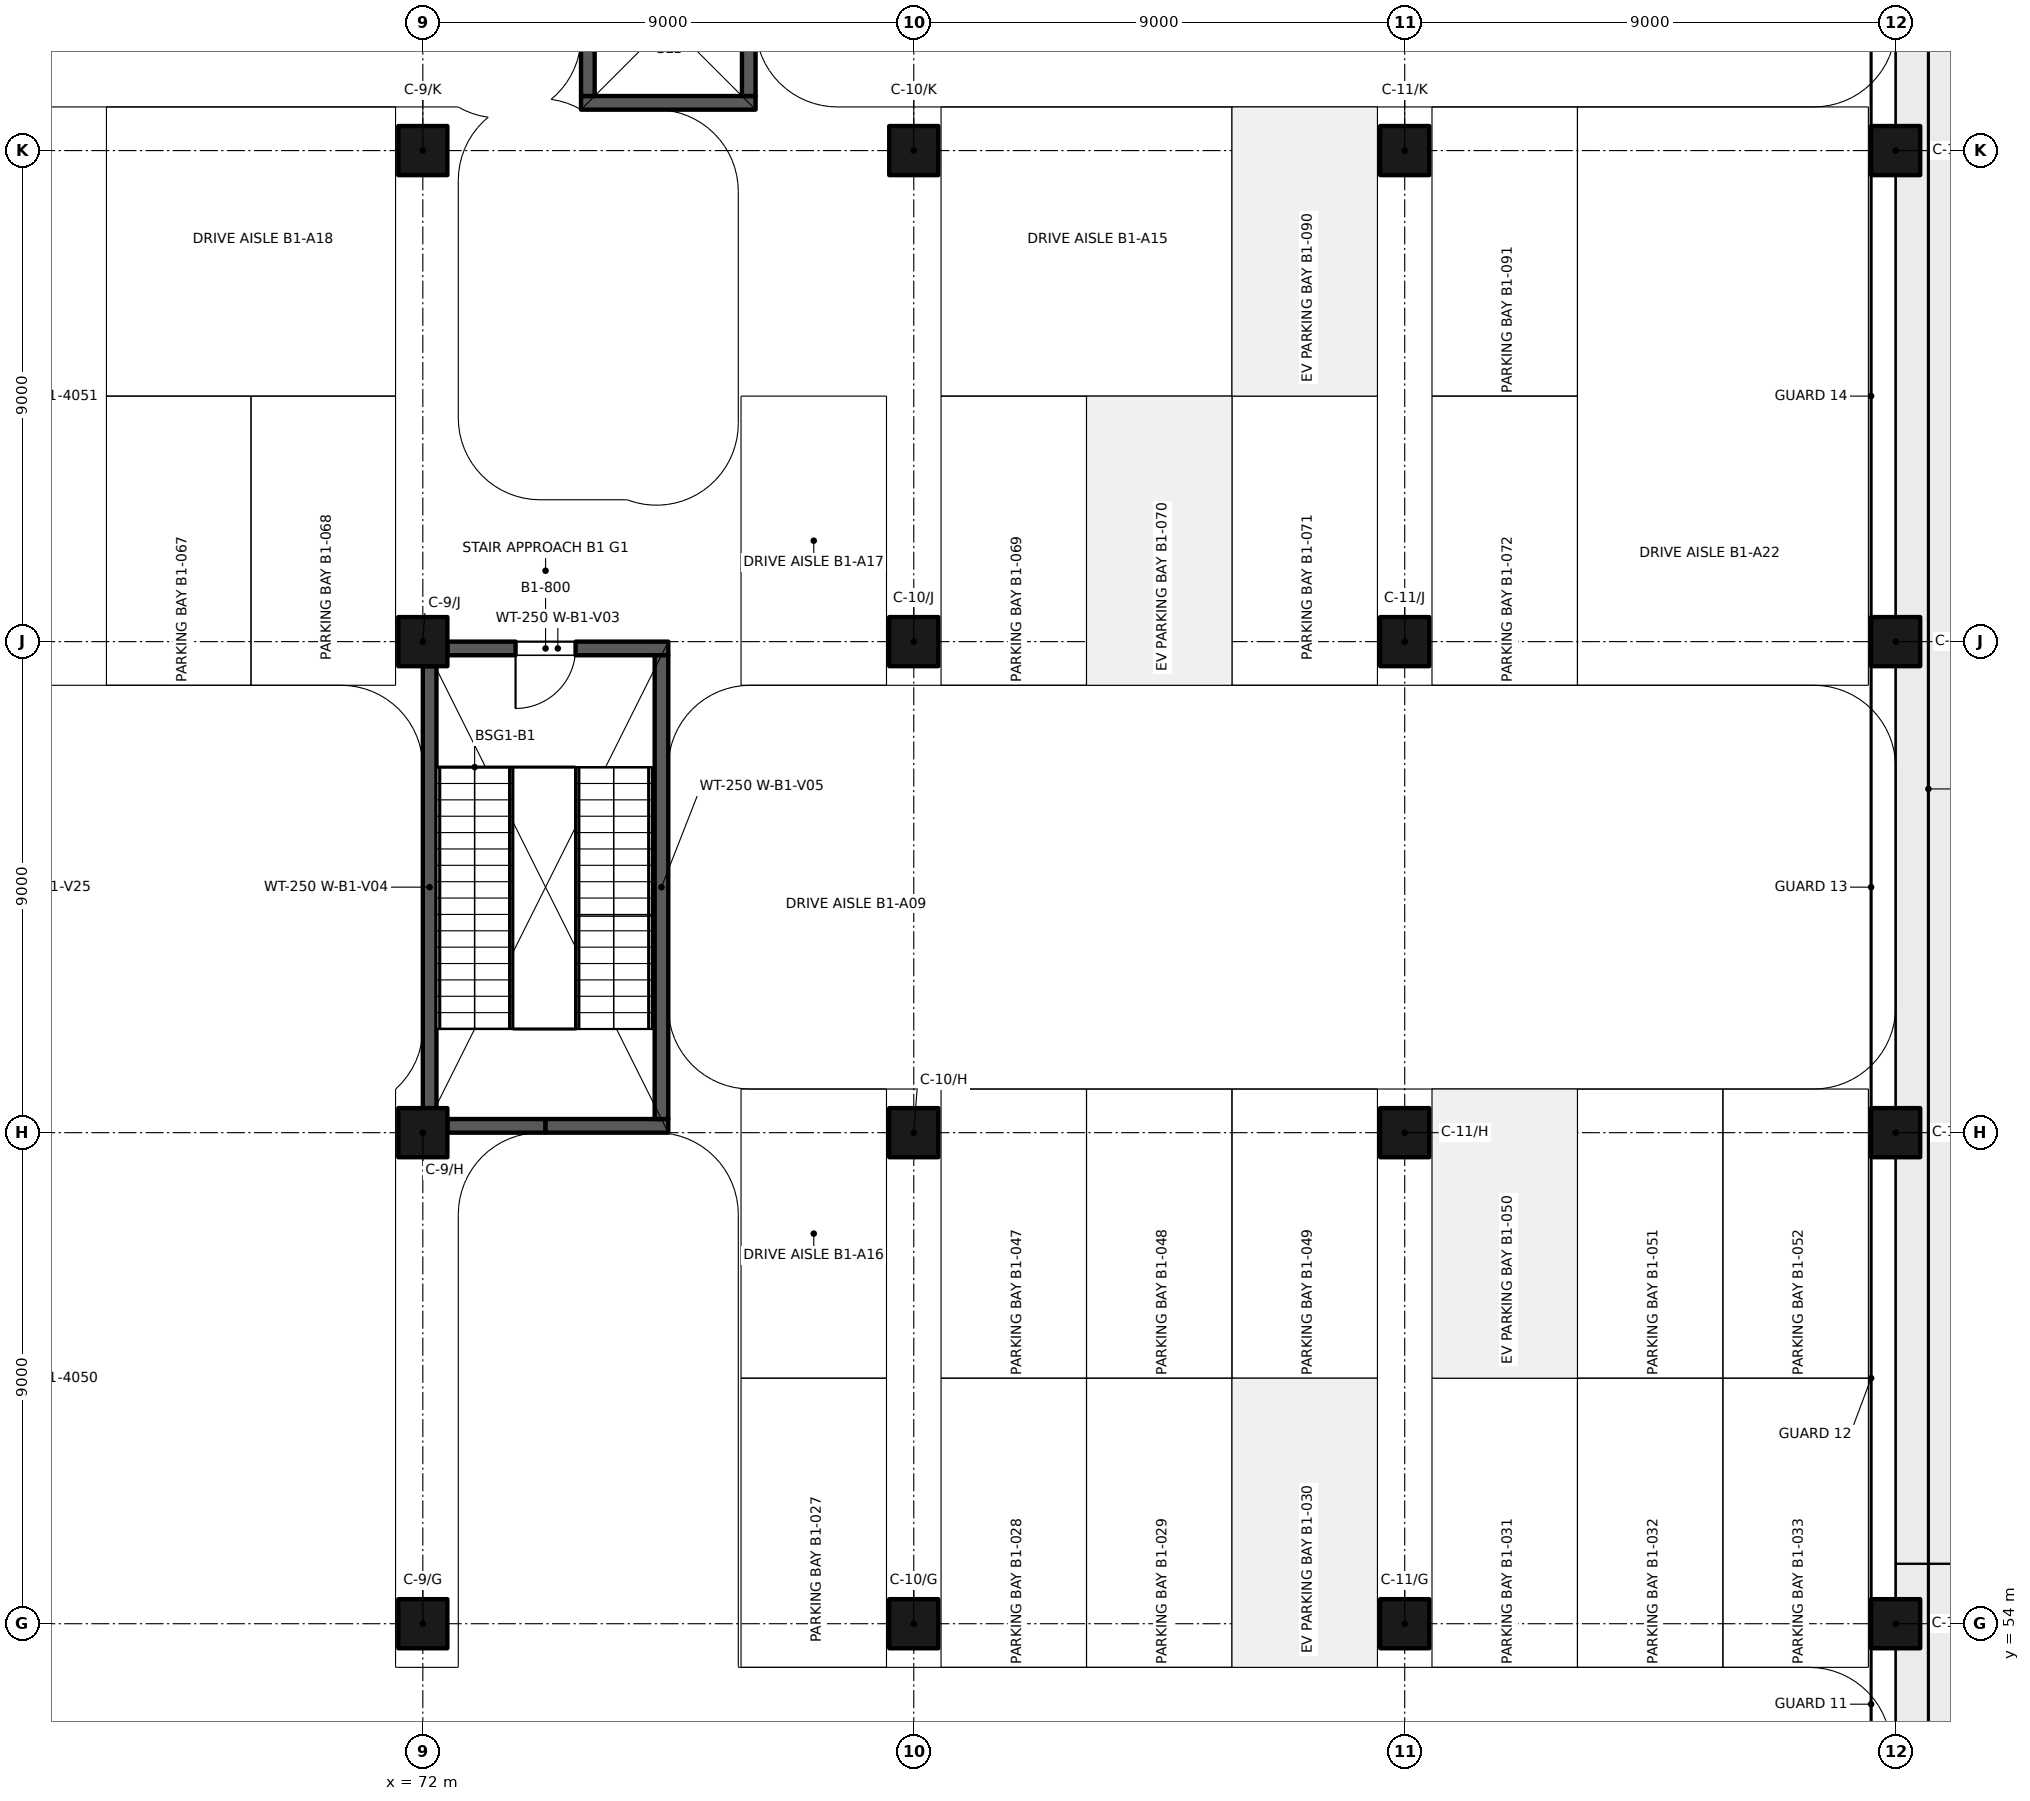
"""IFC4 building model, lengths in metres.
Left out: names, types, materials, properties, quantities, classifications, styles, units other than length and angle.
Written with IfcOpenShell. Run it as: python <this file> out.ifc"""

import sys

from ifc_helpers import new_model, si_unit, direction, frame, frame_2d, origin, origin_2d, place, context, subcontext, project, spatial, rectangle, extrude, element, fill, save


model = new_model("IFC4")
c1 = context("Model", 3, precision=1e-05, world=origin(), true_north=direction((0.0, 1.0)))
c2 = subcontext(c1, "Body", "Model", "MODEL_VIEW")
j1 = project(units=[si_unit("LENGTHUNIT", "METRE"), si_unit("PLANEANGLEUNIT", "RADIAN")], contexts=[c1])
p1 = place(None, origin())
s1 = spatial("IfcSite", under=j1, at=p1, CompositionType="ELEMENT")
p2 = place(p1, origin())
s2 = spatial("IfcBuilding", under=s1, at=p2, CompositionType="ELEMENT")
p3 = place(p2, frame((0.0, 0.0, -5.1)))
s3 = spatial("IfcBuildingStorey", under=s2, at=p3, CompositionType="ELEMENT", Elevation=-5.1)
for number, where, z_axis, x_axis in (
    (1, (72.0, 54.0, 0.0), (0.0, 0.0, 1.0), (1.0, 0.0, 0.0)),
    (2, (81.0, 54.0, 0.0), (0.0, 0.0, 1.0), (1.0, 0.0, 0.0)),
    (3, (90.0, 54.0, 0.0), (0.0, 0.0, 1.0), (1.0, 0.0, 0.0)),
    (4, (99.0, 54.0, 0.0), (0.0, 0.0, 1.0), (1.0, 0.0, 0.0)),
    (5, (72.0, 63.0, 0.0), (0.0, 0.0, 1.0), (1.0, 0.0, 0.0)),
    (6, (81.0, 63.0, 0.0), (0.0, 0.0, 1.0), (1.0, 0.0, 0.0)),
    (7, (90.0, 63.0, 0.0), (0.0, 0.0, 1.0), (1.0, 0.0, 0.0)),
    (8, (99.0, 63.0, 0.0), (0.0, 0.0, 1.0), (1.0, 0.0, 0.0)),
    (9, (72.0, 72.0, 0.0), (0.0, 0.0, 1.0), (1.0, 0.0, 0.0)),
    (10, (81.0, 72.0, 0.0), (0.0, 0.0, 1.0), (1.0, 0.0, 0.0)),
    (11, (90.0, 72.0, 0.0), (0.0, 0.0, 1.0), (1.0, 0.0, 0.0)),
    (12, (99.0, 72.0, 0.0), (0.0, 0.0, 1.0), (1.0, 0.0, 0.0)),
    (13, (72.0, 81.0, 0.0), (0.0, 0.0, 1.0), (1.0, 0.0, 0.0)),
    (14, (81.0, 81.0, 0.0), (0.0, 0.0, 1.0), (1.0, 0.0, 0.0)),
    (15, (90.0, 81.0, 0.0), (0.0, 0.0, 1.0), (1.0, 0.0, 0.0)),
    (16, (99.0, 81.0, 0.0), (0.0, 0.0, 1.0), (1.0, 0.0, 0.0)),
):
    element("IfcColumn", number, at=place(p3, frame(where, z_axis=z_axis, x_axis=x_axis)), inside=s3, PredefinedType="COLUMN", context=c2, shape_type="SweptSolid", body=[
        extrude(rectangle(XDim=0.9, YDim=0.9, at=origin_2d()), origin(), (0.0, 0.0, 1.0), 5.1),
    ])
p4 = place(p3, frame((72.45, 63.125, 0.0), z_axis=(0.0, 0.0, 1.0), x_axis=(1.0, 0.0, 0.0)))
e17 = element("IfcWall", 17, at=p4, inside=s3, PredefinedType="SHEAR", context=c2, shape_type="SweptSolid", body=[
    extrude(rectangle(XDim=1.8, YDim=0.25, at=frame_2d((0.9, 0.0))), origin(), (0.0, 0.0, 1.0), 5.1),
])
p5 = place(p3, frame((74.25, 63.125, 0.0), z_axis=(0.0, 0.0, 1.0), x_axis=(1.0, 0.0, 0.0)))
e18 = element("IfcWall", 18, at=p5, inside=s3, PredefinedType="SHEAR", context=c2, shape_type="SweptSolid", body=[
    extrude(rectangle(XDim=2.25, YDim=0.25, at=frame_2d((1.125, 0.0))), origin(), (0.0, 0.0, 1.0), 5.1),
])
p6 = place(p3, frame((72.45, 71.875, 0.0), z_axis=(0.0, 0.0, 1.0), x_axis=(1.0, 0.0, 0.0)))
e19 = element("IfcWall", 19, at=p6, inside=s3, PredefinedType="SHEAR", context=c2, shape_type="SweptSolid", body=[
    extrude(rectangle(XDim=4.05, YDim=0.25, at=frame_2d((2.025, 0.0))), origin(), (0.0, 0.0, 1.0), 5.1),
])
p7 = place(p6, frame((2.35, 0.0, 0.0), z_axis=(0.0, 0.0, 1.0), x_axis=(-1.0, 0.0, 0.0)))
e20 = element("IfcOpeningElement", 20, at=p7, cuts=e19, PredefinedType="OPENING", context=c2, shape_type="SweptSolid", body=[
    extrude(rectangle(XDim=1.1, YDim=2.1, at=frame_2d((0.55, 1.05))), frame((0.0, 0.135, 0.0), z_axis=(0.0, -1.0, 0.0), x_axis=(1.0, 0.0, 0.0)), (0.0, 0.0, 1.0), 0.27),
])
p8 = place(p3, frame((72.125, 63.45, 0.0), z_axis=(0.0, 0.0, 1.0), x_axis=(0.0, 1.0, 0.0)))
e21 = element("IfcWall", 21, at=p8, inside=s3, PredefinedType="SHEAR", context=c2, shape_type="SweptSolid", body=[
    extrude(rectangle(XDim=8.1, YDim=0.25, at=frame_2d((4.05, 0.0))), origin(), (0.0, 0.0, 1.0), 5.1),
])
p9 = place(p3, frame((76.375, 63.25, 0.0), z_axis=(0.0, 0.0, 1.0), x_axis=(0.0, 1.0, 0.0)))
e22 = element("IfcWall", 22, at=p9, inside=s3, PredefinedType="SHEAR", context=c2, shape_type="SweptSolid", body=[
    extrude(rectangle(XDim=8.5, YDim=0.25, at=frame_2d((4.25, 0.0))), origin(), (0.0, 0.0, 1.0), 5.1),
])
p10 = place(p3, frame((74.9, 81.875, 0.0), z_axis=(0.0, 0.0, 1.0), x_axis=(1.0, 0.0, 0.0)))
e23 = element("IfcWall", 23, at=p10, inside=s3, PredefinedType="SHEAR", context=c2, shape_type="SweptSolid", body=[
    extrude(rectangle(XDim=3.2, YDim=0.25, at=frame_2d((1.6, 0.0))), origin(), (0.0, 0.0, 1.0), 5.1),
])
for number, where, z_axis, x_axis in (
    (24, (75.025, 82.0, 0.0), (0.0, 0.0, 1.0), (0.0, 1.0, 0.0)),
    (25, (77.975, 82.0, 0.0), (0.0, 0.0, 1.0), (0.0, 1.0, 0.0)),
):
    element("IfcWall", number, at=place(p3, frame(where, z_axis=z_axis, x_axis=x_axis)), inside=s3, PredefinedType="SHEAR", context=c2, shape_type="SweptSolid", body=[
        extrude(rectangle(XDim=2.7, YDim=0.25, at=frame_2d((1.35, 0.0))), origin(), (0.0, 0.0, 1.0), 5.1),
    ])
p11 = place(p7, origin())
e26 = element("IfcDoor", 26, at=p11, inside=s3, OperationType="SINGLE_SWING_RIGHT", PredefinedType="DOOR", context=c2, shape_type="SweptSolid", body=[
    extrude(rectangle(XDim=1.1, YDim=2.1, at=frame_2d((0.55, 1.05))), frame((0.0, 0.025, 0.0), z_axis=(0.0, -1.0, 0.0), x_axis=(1.0, 0.0, 0.0)), (0.0, 0.0, 1.0), 0.05),
])
fill(e20, e26)
save(model, sys.argv[1])
